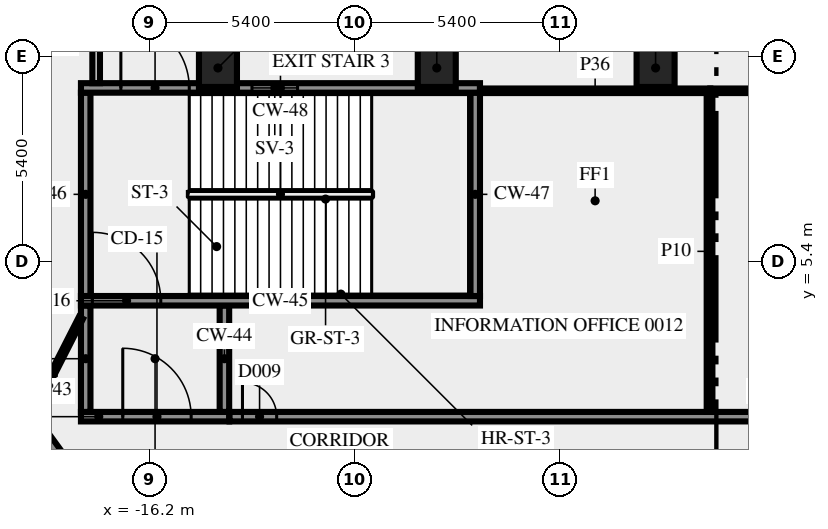
"""IFC4 building model, lengths in metres.
Left out: names, types, materials, properties, quantities, classifications, styles, units other than length and angle.
Written with IfcOpenShell. Run it as: python <this file> out.ifc"""

import sys

from ifc_helpers import new_model, si_unit, direction, frame, frame_2d, origin, origin_2d, place, context, subcontext, project, spatial, rectangle, extrude, element, fill, save


model = new_model("IFC4")
c1 = context("Model", 3, precision=1e-05, world=origin(), true_north=direction((0.0, 1.0)))
c2 = subcontext(c1, "Body", "Model", "MODEL_VIEW")
j1 = project(units=[si_unit("LENGTHUNIT", "METRE"), si_unit("PLANEANGLEUNIT", "RADIAN")], contexts=[c1])
p1 = place(None, origin())
s1 = spatial("IfcSite", under=j1, at=p1, CompositionType="ELEMENT")
p2 = place(p1, origin())
s2 = spatial("IfcBuilding", under=s1, at=p2, CompositionType="ELEMENT")
p3 = place(p2, origin())
s3 = spatial("IfcBuildingStorey", under=s2, at=p3, CompositionType="ELEMENT", Elevation=0.0)
for number, where, z_axis, x_axis in (
    (1, (-2.879, 10.5, 0.0), (0.0, 0.0, 1.0), (-1.0, 0.0, 0.0)),
    (2, (-8.637, 10.5, 0.0), (0.0, 0.0, 1.0), (-1.0, 0.0, 0.0)),
    (3, (-14.395, 10.5, 0.0), (0.0, 0.0, 1.0), (-1.0, 0.0, 0.0)),
):
    element("IfcColumn", number, at=place(p3, frame(where, z_axis=z_axis, x_axis=x_axis)), inside=s3, PredefinedType="COLUMN", context=c2, shape_type="SweptSolid", body=[
        extrude(rectangle(XDim=1.0, YDim=1.0, at=origin_2d()), origin(), (0.0, 0.0, 1.0), 5.6),
    ])
p4 = place(p3, frame((-18.0, 1.325, 0.0), z_axis=(0.0, 0.0, 1.0), x_axis=(1.0, 0.0, 0.0)))
e4 = element("IfcWall", 4, at=p4, inside=s3, PredefinedType="SHEAR", context=c2, shape_type="SweptSolid", body=[
    extrude(rectangle(XDim=3.9, YDim=0.25, at=frame_2d((1.95, 0.0))), origin(), (0.0, 0.0, 1.0), 5.6),
])
p5 = place(p4, frame((1.1, 0.0, 0.0)))
e5 = element("IfcOpeningElement", 5, at=p5, cuts=e4, PredefinedType="OPENING", context=c2, shape_type="SweptSolid", body=[
    extrude(rectangle(XDim=1.8, YDim=2.1, at=frame_2d((0.9, 1.05))), frame((0.0, 0.135, 0.0), z_axis=(0.0, -1.0, 0.0), x_axis=(1.0, 0.0, 0.0)), (0.0, 0.0, 1.0), 0.27),
])
for number, where, z_axis, x_axis in (
    (6, (-17.875, 1.45, 0.0), (0.0, 0.0, 1.0), (0.0, 1.0, 0.0)),
    (7, (-14.225, 1.45, 0.0), (0.0, 0.0, 1.0), (0.0, 1.0, 0.0)),
):
    element("IfcWall", number, at=place(p3, frame(where, z_axis=z_axis, x_axis=x_axis)), inside=s3, PredefinedType="SHEAR", context=c2, shape_type="SweptSolid", body=[
        extrude(rectangle(XDim=2.8, YDim=0.25, at=frame_2d((1.4, 0.0))), origin(), (0.0, 0.0, 1.0), 5.6),
    ])
p6 = place(p3, frame((-18.0, 4.375, 0.0), z_axis=(0.0, 0.0, 1.0), x_axis=(1.0, 0.0, 0.0)))
e8 = element("IfcWall", 8, at=p6, inside=s3, PredefinedType="SHEAR", context=c2, shape_type="SweptSolid", body=[
    extrude(rectangle(XDim=10.5, YDim=0.25, at=frame_2d((5.25, 0.0))), origin(), (0.0, 0.0, 1.0), 5.6),
])
p7 = place(p6, frame((0.3, 0.0, 0.0)))
e9 = element("IfcOpeningElement", 9, at=p7, cuts=e8, PredefinedType="OPENING", context=c2, shape_type="SweptSolid", body=[
    extrude(rectangle(XDim=1.8, YDim=2.1, at=frame_2d((0.9, 1.05))), frame((0.0, 0.135, 0.0), z_axis=(0.0, -1.0, 0.0), x_axis=(1.0, 0.0, 0.0)), (0.0, 0.0, 1.0), 0.27),
])
for number, where, z_axis, x_axis in (
    (10, (-17.875, 4.5, 0.0), (0.0, 0.0, 1.0), (0.0, 1.0, 0.0)),
    (11, (-7.625, 4.5, 0.0), (0.0, 0.0, 1.0), (0.0, 1.0, 0.0)),
):
    element("IfcWall", number, at=place(p3, frame(where, z_axis=z_axis, x_axis=x_axis)), inside=s3, PredefinedType="SHEAR", context=c2, shape_type="SweptSolid", body=[
        extrude(rectangle(XDim=5.35, YDim=0.25, at=frame_2d((2.675, 0.0))), origin(), (0.0, 0.0, 1.0), 5.6),
    ])
p8 = place(p3, frame((-18.0, 9.975, 0.0), z_axis=(0.0, 0.0, 1.0), x_axis=(1.0, 0.0, 0.0)))
e12 = element("IfcWall", 12, at=p8, inside=s3, PredefinedType="SHEAR", context=c2, shape_type="SweptSolid", body=[
    extrude(rectangle(XDim=10.5, YDim=0.25, at=frame_2d((5.25, 0.0))), origin(), (0.0, 0.0, 1.0), 5.6),
])
p9 = place(p8, frame((1.05, 0.0, 0.0)))
e13 = element("IfcOpeningElement", 13, at=p9, cuts=e12, PredefinedType="OPENING", context=c2, shape_type="SweptSolid", body=[
    extrude(rectangle(XDim=1.8, YDim=2.1, at=frame_2d((0.9, 1.05))), frame((0.0, 0.135, 0.0), z_axis=(0.0, -1.0, 0.0), x_axis=(1.0, 0.0, 0.0)), (0.0, 0.0, 1.0), 0.27),
])
p10 = place(p8, frame((4.5, 0.0, 1.0)))
e14 = element("IfcOpeningElement", 14, at=p10, cuts=e12, PredefinedType="OPENING", context=c2, shape_type="SweptSolid", body=[
    extrude(rectangle(XDim=1.2, YDim=1.2, at=frame_2d((0.6, 0.6))), frame((0.0, 0.135, 0.0), z_axis=(0.0, -1.0, 0.0), x_axis=(1.0, 0.0, 0.0)), (0.0, 0.0, 1.0), 0.27),
])
p11 = place(p3, frame((-17.6, 10.1, 0.0), z_axis=(0.0, 0.0, 1.0), x_axis=(0.0, 1.0, 0.0)))
e15 = element("IfcWall", 15, at=p11, inside=s3, PredefinedType="SOLIDWALL", context=c2, shape_type="SweptSolid", body=[
    extrude(rectangle(XDim=2.1, YDim=0.2, at=frame_2d((1.05, 0.0))), origin(), (0.0, 0.0, 1.0), 5.6),
])
p12 = place(p3, frame((-37.232, 25.972, 0.0), z_axis=(0.0, 0.0, 1.0), x_axis=(0.587786323093, -0.809016216391, 0.0)))
e16 = element("IfcWall", 16, at=p12, inside=s3, PredefinedType="SOLIDWALL", context=c2, shape_type="SweptSolid", body=[
    extrude(rectangle(XDim=33.493, YDim=0.25, at=frame_2d((16.747, 0.0))), origin(), (0.0, 0.0, 1.0), 5.6),
])
p13 = place(p12, frame((6.462, 0.0, 0.0)))
e17 = element("IfcOpeningElement", 17, at=p13, cuts=e16, PredefinedType="OPENING", context=c2, shape_type="SweptSolid", body=[
    extrude(rectangle(XDim=1.8, YDim=2.1, at=frame_2d((0.9, 1.05))), frame((0.0, 0.135, 0.0), z_axis=(0.0, -1.0, 0.0), x_axis=(1.0, 0.0, 0.0)), (0.0, 0.0, 1.0), 0.27),
])
p14 = place(p12, frame((15.085, 0.0, 0.0)))
e18 = element("IfcOpeningElement", 18, at=p14, cuts=e16, PredefinedType="OPENING", context=c2, shape_type="SweptSolid", body=[
    extrude(rectangle(XDim=0.9, YDim=2.1, at=frame_2d((0.45, 1.05))), frame((0.0, 0.135, 0.0), z_axis=(0.0, -1.0, 0.0), x_axis=(1.0, 0.0, 0.0)), (0.0, 0.0, 1.0), 0.27),
])
p15 = place(p3, frame((-14.09, 1.325, 0.0), z_axis=(0.0, 0.0, 1.0), x_axis=(1.0, 0.0, 0.0)))
e19 = element("IfcWall", 19, at=p15, inside=s3, PredefinedType="SOLIDWALL", context=c2, shape_type="SweptSolid", body=[
    extrude(rectangle(XDim=28.18, YDim=0.25, at=frame_2d((14.09, 0.0))), origin(), (0.0, 0.0, 1.0), 5.6),
])
p16 = place(p15, frame((0.34, 0.0, 0.0)))
e20 = element("IfcOpeningElement", 20, at=p16, cuts=e19, PredefinedType="OPENING", context=c2, shape_type="SweptSolid", body=[
    extrude(rectangle(XDim=0.9, YDim=2.1, at=frame_2d((0.45, 1.05))), frame((0.0, 0.135, 0.0), z_axis=(0.0, -1.0, 0.0), x_axis=(1.0, 0.0, 0.0)), (0.0, 0.0, 1.0), 0.27),
])
p17 = place(p15, frame((20.038, 0.0, 0.0)))
e21 = element("IfcOpeningElement", 21, at=p17, cuts=e19, PredefinedType="OPENING", context=c2, shape_type="SweptSolid", body=[
    extrude(rectangle(XDim=0.9, YDim=2.1, at=frame_2d((0.45, 1.05))), frame((0.0, 0.135, 0.0), z_axis=(0.0, -1.0, 0.0), x_axis=(1.0, 0.0, 0.0)), (0.0, 0.0, 1.0), 0.27),
])
p18 = place(p15, frame((21.638, 0.0, 0.0)))
e22 = element("IfcOpeningElement", 22, at=p18, cuts=e19, PredefinedType="OPENING", context=c2, shape_type="SweptSolid", body=[
    extrude(rectangle(XDim=0.9, YDim=2.1, at=frame_2d((0.45, 1.05))), frame((0.0, 0.135, 0.0), z_axis=(0.0, -1.0, 0.0), x_axis=(1.0, 0.0, 0.0)), (0.0, 0.0, 1.0), 0.27),
])
p19 = place(p3, frame((-1.459, 1.45, 0.0), z_axis=(0.0, 0.0, 1.0), x_axis=(-0.000115570194, 0.999999993322, 0.0)))
e23 = element("IfcWall", 23, at=p19, inside=s3, PredefinedType="PARTITIONING", context=c2, shape_type="SweptSolid", body=[
    extrude(rectangle(XDim=8.45, YDim=0.15, at=frame_2d((4.225, 0.0))), origin(), (0.0, 0.0, 1.0), 5.6),
])
p20 = place(p3, frame((-1.44, 9.9, 0.0), z_axis=(0.0, 0.0, 1.0), x_axis=(-1.0, 0.0, 0.0)))
e24 = element("IfcWall", 24, at=p20, inside=s3, PredefinedType="PARTITIONING", context=c2, shape_type="SweptSolid", body=[
    extrude(rectangle(XDim=6.06, YDim=0.12, at=frame_2d((3.03, 0.0))), origin(), (0.0, 0.0, 1.0), 5.6),
])
p21 = place(p3, frame((7.198, 9.9, 0.0), z_axis=(0.0, 0.0, 1.0), x_axis=(-1.0, 0.0, 0.0)))
e25 = element("IfcWall", 25, at=p21, inside=s3, PredefinedType="PARTITIONING", context=c2, shape_type="SweptSolid", body=[
    extrude(rectangle(XDim=8.638, YDim=0.12, at=frame_2d((4.319, 0.0))), origin(), (0.0, 0.0, 1.0), 5.6),
])
p22 = place(p3, frame((-19.261, 1.45, 0.0), z_axis=(0.0, 0.0, 1.0), x_axis=(0.453950796792, 0.891026752736, 0.0)))
e26 = element("IfcWall", 26, at=p22, inside=s3, PredefinedType="PARTITIONING", context=c2, shape_type="SweptSolid", body=[
    extrude(rectangle(XDim=2.778, YDim=0.12, at=frame_2d((1.389, 0.0))), origin(), (0.0, 0.0, 1.0), 5.6),
])
p23 = place(p5, origin())
e27 = element("IfcDoor", 27, at=p23, inside=s3, OperationType="DOUBLE_DOOR_SINGLE_SWING", PredefinedType="DOOR", context=c2, shape_type="SweptSolid", body=[
    extrude(rectangle(XDim=1.8, YDim=2.1, at=frame_2d((0.9, 1.05))), frame((0.0, 0.025, 0.0), z_axis=(0.0, -1.0, 0.0), x_axis=(1.0, 0.0, 0.0)), (0.0, 0.0, 1.0), 0.05),
])
fill(e5, e27)
p24 = place(p7, origin())
e28 = element("IfcDoor", 28, at=p24, inside=s3, OperationType="DOUBLE_DOOR_SINGLE_SWING", PredefinedType="DOOR", context=c2, shape_type="SweptSolid", body=[
    extrude(rectangle(XDim=1.8, YDim=2.1, at=frame_2d((0.9, 1.05))), frame((0.0, 0.025, 0.0), z_axis=(0.0, -1.0, 0.0), x_axis=(1.0, 0.0, 0.0)), (0.0, 0.0, 1.0), 0.05),
])
fill(e9, e28)
p25 = place(p9, origin())
e29 = element("IfcDoor", 29, at=p25, inside=s3, OperationType="DOUBLE_DOOR_SINGLE_SWING", PredefinedType="DOOR", context=c2, shape_type="SweptSolid", body=[
    extrude(rectangle(XDim=1.8, YDim=2.1, at=frame_2d((0.9, 1.05))), frame((0.0, 0.025, 0.0), z_axis=(0.0, -1.0, 0.0), x_axis=(1.0, 0.0, 0.0)), (0.0, 0.0, 1.0), 0.05),
])
fill(e13, e29)
p26 = place(p10, origin())
e30 = element("IfcWindow", 30, at=p26, inside=s3, PartitioningType="SINGLE_PANEL", PredefinedType="WINDOW", context=c2, shape_type="SweptSolid", body=[
    extrude(rectangle(XDim=1.2, YDim=1.2, at=frame_2d((0.6, 0.6))), frame((0.0, 0.03, 0.0), z_axis=(0.0, -1.0, 0.0), x_axis=(1.0, 0.0, 0.0)), (0.0, 0.0, 1.0), 0.06),
])
fill(e14, e30)
p27 = place(p16, origin())
e31 = element("IfcDoor", 31, at=p27, inside=s3, OperationType="SINGLE_SWING_LEFT", PredefinedType="DOOR", context=c2, shape_type="SweptSolid", body=[
    extrude(rectangle(XDim=0.9, YDim=2.1, at=frame_2d((0.45, 1.05))), frame((0.0, 0.025, 0.0), z_axis=(0.0, -1.0, 0.0), x_axis=(1.0, 0.0, 0.0)), (0.0, 0.0, 1.0), 0.05),
])
fill(e20, e31)
save(model, sys.argv[1])
